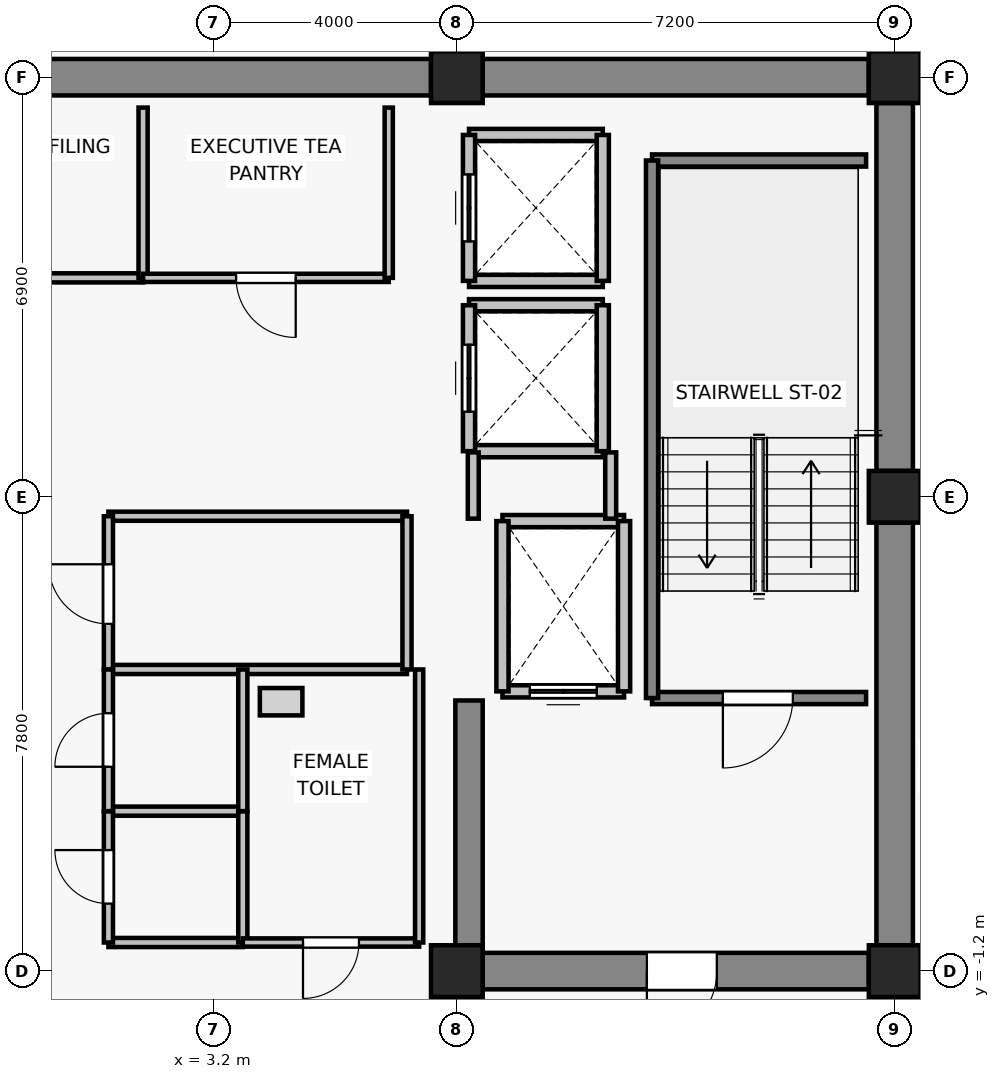
"""IFC4 building model, lengths in metres.
Left out: names, types, materials, properties, quantities, classifications, styles, units other than length and angle.
Written with IfcOpenShell. Run it as: python <this file> out.ifc"""

import sys

from ifc_helpers import new_model, si_unit, direction, frame, frame_2d, origin, origin_2d, place, context, subcontext, project, spatial, rectangle, extrude, source, transform, mapped, element, fill, save


model = new_model("IFC4")
c1 = context("Model", 3, precision=1e-05, world=origin(), true_north=direction((0.0, 1.0)))
c2 = subcontext(c1, "Body", "Model", "MODEL_VIEW")
j1 = project(units=[si_unit("LENGTHUNIT", "METRE"), si_unit("PLANEANGLEUNIT", "RADIAN")], contexts=[c1])
p1 = place(None, origin())
s1 = spatial("IfcSite", under=j1, at=p1, CompositionType="ELEMENT")
p2 = place(p1, origin())
s2 = spatial("IfcBuilding", under=s1, at=p2, CompositionType="ELEMENT")
p3 = place(p2, frame((0.0, 0.0, 248.5)))
s3 = spatial("IfcBuildingStorey", under=s2, at=p3, CompositionType="ELEMENT", Elevation=248.5)
for number, where, z_axis, x_axis in (
    (1, (7.2, -1.2, 0.0), (0.0, 0.0, 1.0), (1.0, 0.0, 0.0)),
    (2, (14.4, -1.2, 0.0), (0.0, 0.0, 1.0), (1.0, 0.0, 0.0)),
    (3, (14.4, 6.6, 0.0), (0.0, 0.0, 1.0), (1.0, 0.0, 0.0)),
    (4, (7.2, 13.5, 0.0), (0.0, 0.0, 1.0), (1.0, 0.0, 0.0)),
    (5, (14.4, 13.5, 0.0), (0.0, 0.0, 1.0), (1.0, 0.0, 0.0)),
):
    element("IfcColumn", number, at=place(p3, frame(where, z_axis=z_axis, x_axis=x_axis)), inside=s3, PredefinedType="COLUMN", context=c2, shape_type="SweptSolid", body=[
        extrude(rectangle(XDim=0.85, YDim=0.85, at=origin_2d()), origin(), (0.0, 0.0, 1.0), 3.3),
    ])
p4 = place(p3, frame((-6.775, 13.5, 0.0), z_axis=(0.0, 0.0, 1.0), x_axis=(1.0, 0.0, 0.0)))
e6 = element("IfcWall", 6, at=p4, inside=s3, PredefinedType="SHEAR", context=c2, shape_type="SweptSolid", body=[
    extrude(rectangle(XDim=13.55, YDim=0.6, at=frame_2d((6.775, 0.0))), origin(), (0.0, 0.0, 1.0), 3.075),
])
p5 = place(p3, frame((7.625, 13.5, 0.0), z_axis=(0.0, 0.0, 1.0), x_axis=(1.0, 0.0, 0.0)))
e7 = element("IfcWall", 7, at=p5, inside=s3, PredefinedType="SHEAR", context=c2, shape_type="SweptSolid", body=[
    extrude(rectangle(XDim=6.35, YDim=0.6, at=frame_2d((3.175, 0.0))), origin(), (0.0, 0.0, 1.0), 3.075),
])
p6 = place(p3, frame((14.4, -0.775, 0.0), z_axis=(0.0, 0.0, 1.0), x_axis=(0.0, 1.0, 0.0)))
e8 = element("IfcWall", 8, at=p6, inside=s3, PredefinedType="SHEAR", context=c2, shape_type="SweptSolid", body=[
    extrude(rectangle(XDim=6.95, YDim=0.6, at=frame_2d((3.475, 0.0))), origin(), (0.0, 0.0, 1.0), 3.075),
])
p7 = place(p3, frame((14.4, 7.025, 0.0), z_axis=(0.0, 0.0, 1.0), x_axis=(0.0, 1.0, 0.0)))
e9 = element("IfcWall", 9, at=p7, inside=s3, PredefinedType="SHEAR", context=c2, shape_type="SweptSolid", body=[
    extrude(rectangle(XDim=6.05, YDim=0.6, at=frame_2d((3.025, 0.0))), origin(), (0.0, 0.0, 1.0), 3.075),
])
p8 = place(p3, frame((13.975, -1.2, 0.0), z_axis=(0.0, 0.0, 1.0), x_axis=(-1.0, 0.0, 0.0)))
e10 = element("IfcWall", 10, at=p8, inside=s3, PredefinedType="SHEAR", context=c2, shape_type="SweptSolid", body=[
    extrude(rectangle(XDim=6.35, YDim=0.6, at=frame_2d((3.175, 0.0))), origin(), (0.0, 0.0, 1.0), 3.075),
])
p9 = place(p8, frame((2.5, 0.0, 0.0)))
e11 = element("IfcOpeningElement", 11, at=p9, cuts=e10, PredefinedType="OPENING", context=c2, shape_type="SweptSolid", body=[
    extrude(rectangle(XDim=1.15, YDim=2.15, at=frame_2d((0.575, 1.075))), frame((0.0, 0.31, 0.0), z_axis=(0.0, -1.0, 0.0), x_axis=(1.0, 0.0, 0.0)), (0.0, 0.0, 1.0), 0.62),
])
p10 = place(p3, frame((7.4, -0.9, 0.0), z_axis=(0.0, 0.0, 1.0), x_axis=(0.0, 1.0, 0.0)))
e12 = element("IfcWall", 12, at=p10, inside=s3, PredefinedType="SHEAR", context=c2, shape_type="SweptSolid", body=[
    extrude(rectangle(XDim=4.15, YDim=0.45, at=frame_2d((2.075, 0.0))), origin(), (0.0, 0.0, 1.0), 3.075),
])
p11 = place(p3, frame((9.95, 3.4, 0.0), z_axis=(0.0, 0.0, 1.0), x_axis=(-1.0, 0.0, 0.0)))
e13 = element("IfcWall", 13, at=p11, inside=s3, PredefinedType="SOLIDWALL", context=c2, shape_type="SweptSolid", body=[
    extrude(rectangle(XDim=2.0, YDim=0.2, at=frame_2d((1.0, 0.0))), origin(), (0.0, 0.0, 1.0), 3.075),
])
p12 = place(p11, frame((0.45, 0.0, 0.0)))
e14 = element("IfcOpeningElement", 14, at=p12, cuts=e13, PredefinedType="OPENING", context=c2, shape_type="SweptSolid", body=[
    extrude(rectangle(XDim=1.1, YDim=2.2, at=frame_2d((0.55, 1.1))), frame((0.0, 0.11, 0.0), z_axis=(0.0, -1.0, 0.0), x_axis=(1.0, 0.0, 0.0)), (0.0, 0.0, 1.0), 0.22),
])
p13 = place(p3, frame((7.95, 6.2, 0.0), z_axis=(0.0, 0.0, 1.0), x_axis=(1.0, 0.0, 0.0)))
e15 = element("IfcWall", 15, at=p13, inside=s3, PredefinedType="SOLIDWALL", context=c2, shape_type="SweptSolid", body=[
    extrude(rectangle(XDim=2.0, YDim=0.2, at=frame_2d((1.0, 0.0))), origin(), (0.0, 0.0, 1.0), 3.075),
])
for number, where, z_axis, x_axis in (
    (16, (7.95, 3.4, 0.0), (0.0, 0.0, 1.0), (0.0, 1.0, 0.0)),
    (17, (9.95, 6.2, 0.0), (0.0, 0.0, 1.0), (0.0, -1.0, 0.0)),
):
    element("IfcWall", number, at=place(p3, frame(where, z_axis=z_axis, x_axis=x_axis)), inside=s3, PredefinedType="SOLIDWALL", context=c2, shape_type="SweptSolid", body=[
        extrude(rectangle(XDim=2.8, YDim=0.2, at=frame_2d((1.4, 0.0))), origin(), (0.0, 0.0, 1.0), 3.075),
    ])
for number, where, z_axis, x_axis in (
    (18, (9.6, 7.35, 0.0), (0.0, 0.0, 1.0), (-1.0, 0.0, 0.0)),
    (19, (7.4, 9.75, 0.0), (0.0, 0.0, 1.0), (1.0, 0.0, 0.0)),
):
    element("IfcWall", number, at=place(p3, frame(where, z_axis=z_axis, x_axis=x_axis)), inside=s3, PredefinedType="SOLIDWALL", context=c2, shape_type="SweptSolid", body=[
        extrude(rectangle(XDim=2.2, YDim=0.2, at=frame_2d((1.1, 0.0))), origin(), (0.0, 0.0, 1.0), 2.615),
    ])
p14 = place(p3, frame((7.4, 7.35, 0.0), z_axis=(0.0, 0.0, 1.0), x_axis=(0.0, 1.0, 0.0)))
e20 = element("IfcWall", 20, at=p14, inside=s3, PredefinedType="SOLIDWALL", context=c2, shape_type="SweptSolid", body=[
    extrude(rectangle(XDim=2.4, YDim=0.2, at=frame_2d((1.2, 0.0))), origin(), (0.0, 0.0, 1.0), 2.615),
])
p15 = place(p14, frame((0.65, 0.0, 0.0)))
e21 = element("IfcOpeningElement", 21, at=p15, cuts=e20, PredefinedType="OPENING", context=c2, shape_type="SweptSolid", body=[
    extrude(rectangle(XDim=1.1, YDim=2.2, at=frame_2d((0.55, 1.1))), frame((0.0, 0.11, 0.0), z_axis=(0.0, -1.0, 0.0), x_axis=(1.0, 0.0, 0.0)), (0.0, 0.0, 1.0), 0.22),
])
p16 = place(p3, frame((9.6, 9.75, 0.0), z_axis=(0.0, 0.0, 1.0), x_axis=(0.0, -1.0, 0.0)))
e22 = element("IfcWall", 22, at=p16, inside=s3, PredefinedType="SOLIDWALL", context=c2, shape_type="SweptSolid", body=[
    extrude(rectangle(XDim=2.4, YDim=0.2, at=frame_2d((1.2, 0.0))), origin(), (0.0, 0.0, 1.0), 3.075),
])
for number, where, z_axis, x_axis in (
    (23, (9.6, 10.15, 0.0), (0.0, 0.0, 1.0), (-1.0, 0.0, 0.0)),
    (24, (7.4, 12.55, 0.0), (0.0, 0.0, 1.0), (1.0, 0.0, 0.0)),
):
    element("IfcWall", number, at=place(p3, frame(where, z_axis=z_axis, x_axis=x_axis)), inside=s3, PredefinedType="SOLIDWALL", context=c2, shape_type="SweptSolid", body=[
        extrude(rectangle(XDim=2.2, YDim=0.2, at=frame_2d((1.1, 0.0))), origin(), (0.0, 0.0, 1.0), 2.615),
    ])
p17 = place(p3, frame((7.4, 10.15, 0.0), z_axis=(0.0, 0.0, 1.0), x_axis=(0.0, 1.0, 0.0)))
e25 = element("IfcWall", 25, at=p17, inside=s3, PredefinedType="SOLIDWALL", context=c2, shape_type="SweptSolid", body=[
    extrude(rectangle(XDim=2.4, YDim=0.2, at=frame_2d((1.2, 0.0))), origin(), (0.0, 0.0, 1.0), 2.615),
])
p18 = place(p17, frame((0.65, 0.0, 0.0)))
e26 = element("IfcOpeningElement", 26, at=p18, cuts=e25, PredefinedType="OPENING", context=c2, shape_type="SweptSolid", body=[
    extrude(rectangle(XDim=1.1, YDim=2.2, at=frame_2d((0.55, 1.1))), frame((0.0, 0.11, 0.0), z_axis=(0.0, -1.0, 0.0), x_axis=(1.0, 0.0, 0.0)), (0.0, 0.0, 1.0), 0.22),
])
p19 = place(p3, frame((9.6, 12.55, 0.0), z_axis=(0.0, 0.0, 1.0), x_axis=(0.0, -1.0, 0.0)))
e27 = element("IfcWall", 27, at=p19, inside=s3, PredefinedType="SOLIDWALL", context=c2, shape_type="SweptSolid", body=[
    extrude(rectangle(XDim=2.4, YDim=0.2, at=frame_2d((1.2, 0.0))), origin(), (0.0, 0.0, 1.0), 3.075),
])
p20 = place(p3, frame((13.93, 3.29, 0.0), z_axis=(0.0, 0.0, 1.0), x_axis=(-1.0, 0.0, 0.0)))
e28 = element("IfcWall", 28, at=p20, inside=s3, PredefinedType="SOLIDWALL", context=c2, shape_type="SweptSolid", body=[
    extrude(rectangle(XDim=3.52, YDim=0.2, at=frame_2d((1.76, 0.0))), origin(), (0.0, 0.0, 1.0), 3.075),
])
p21 = place(p20, frame((1.205, 0.0, 0.0)))
e29 = element("IfcOpeningElement", 29, at=p21, cuts=e28, PredefinedType="OPENING", context=c2, shape_type="SweptSolid", body=[
    extrude(rectangle(XDim=1.15, YDim=2.15, at=frame_2d((0.575, 1.075))), frame((0.0, 0.11, 0.0), z_axis=(0.0, -1.0, 0.0), x_axis=(1.0, 0.0, 0.0)), (0.0, 0.0, 1.0), 0.22),
])
p22 = place(p3, frame((10.41, 12.13, 0.0), z_axis=(0.0, 0.0, 1.0), x_axis=(1.0, 0.0, 0.0)))
e30 = element("IfcWall", 30, at=p22, inside=s3, PredefinedType="SOLIDWALL", context=c2, shape_type="SweptSolid", body=[
    extrude(rectangle(XDim=3.52, YDim=0.2, at=frame_2d((1.76, 0.0))), origin(), (0.0, 0.0, 1.0), 3.075),
])
p23 = place(p3, frame((10.41, 3.29, 0.0), z_axis=(0.0, 0.0, 1.0), x_axis=(0.0, 1.0, 0.0)))
e31 = element("IfcWall", 31, at=p23, inside=s3, PredefinedType="SOLIDWALL", context=c2, shape_type="SweptSolid", body=[
    extrude(rectangle(XDim=8.84, YDim=0.2, at=frame_2d((4.42, 0.0))), origin(), (0.0, 0.0, 1.0), 3.075),
])
p24 = place(p3, frame((7.47, 6.24, 0.0), z_axis=(0.0, 0.0, 1.0), x_axis=(0.0, 1.0, 0.0)))
e32 = element("IfcWall", 32, at=p24, inside=s3, PredefinedType="PARTITIONING", context=c2, shape_type="SweptSolid", body=[
    extrude(rectangle(XDim=1.09, YDim=0.18, at=frame_2d((0.545, 0.0))), origin(), (0.0, 0.0, 1.0), 2.615),
])
p25 = place(p3, frame((9.73, 7.33, 0.0), z_axis=(0.0, 0.0, 1.0), x_axis=(0.0, -1.0, 0.0)))
e33 = element("IfcWall", 33, at=p25, inside=s3, PredefinedType="PARTITIONING", context=c2, shape_type="SweptSolid", body=[
    extrude(rectangle(XDim=1.09, YDim=0.18, at=frame_2d((0.545, 0.0))), origin(), (0.0, 0.0, 1.0), 3.075),
])
p26 = place(p3, frame((2.04, 10.2, 0.0), z_axis=(0.0, 0.0, 1.0), x_axis=(-1.0, 0.0, 0.0)))
e34 = element("IfcWall", 34, at=p26, inside=s3, PredefinedType="PARTITIONING", context=c2, shape_type="SweptSolid", body=[
    extrude(rectangle(XDim=4.16, YDim=0.15, at=frame_2d((2.08, 0.0))), origin(), (0.0, 0.0, 1.0), 3.075),
])
p27 = place(p26, frame((1.55, 0.0, 0.0)))
e35 = element("IfcOpeningElement", 35, at=p27, cuts=e34, PredefinedType="OPENING", context=c2, shape_type="SweptSolid", body=[
    extrude(rectangle(XDim=0.98, YDim=2.15, at=frame_2d((0.49, 1.075))), frame((0.0, 0.085, 0.0), z_axis=(0.0, -1.0, 0.0), x_axis=(1.0, 0.0, 0.0)), (0.0, 0.0, 1.0), 0.17),
])
p28 = place(p3, frame((2.04, 13.0, 0.0), z_axis=(0.0, 0.0, 1.0), x_axis=(0.0, -1.0, 0.0)))
e36 = element("IfcWall", 36, at=p28, inside=s3, PredefinedType="PARTITIONING", context=c2, shape_type="SweptSolid", body=[
    extrude(rectangle(XDim=2.8, YDim=0.15, at=frame_2d((1.4, 0.0))), origin(), (0.0, 0.0, 1.0), 3.075),
])
p29 = place(p3, frame((6.08, 10.2, 0.0), z_axis=(0.0, 0.0, 1.0), x_axis=(-1.0, 0.0, 0.0)))
e37 = element("IfcWall", 37, at=p29, inside=s3, PredefinedType="PARTITIONING", context=c2, shape_type="SweptSolid", body=[
    extrude(rectangle(XDim=4.04, YDim=0.135, at=frame_2d((2.02, 0.0))), origin(), (0.0, 0.0, 1.0), 3.075),
])
p30 = place(p29, frame((1.53, 0.0, 0.0)))
e38 = element("IfcOpeningElement", 38, at=p30, cuts=e37, PredefinedType="OPENING", context=c2, shape_type="SweptSolid", body=[
    extrude(rectangle(XDim=0.98, YDim=2.15, at=frame_2d((0.49, 1.075))), frame((0.0, 0.077, 0.0), z_axis=(0.0, -1.0, 0.0), x_axis=(1.0, 0.0, 0.0)), (0.0, 0.0, 1.0), 0.155),
])
p31 = place(p3, frame((6.08, 13.0, 0.0), z_axis=(0.0, 0.0, 1.0), x_axis=(0.0, -1.0, 0.0)))
e39 = element("IfcWall", 39, at=p31, inside=s3, PredefinedType="PARTITIONING", context=c2, shape_type="SweptSolid", body=[
    extrude(rectangle(XDim=2.8, YDim=0.135, at=frame_2d((1.4, 0.0))), origin(), (0.0, 0.0, 1.0), 3.075),
])
for number, where, z_axis, x_axis in (
    (40, (6.38, 3.76, 0.0), (0.0, 0.0, 1.0), (-1.0, 0.0, 0.0)),
    (41, (1.47, 6.28, 0.0), (0.0, 0.0, 1.0), (1.0, 0.0, 0.0)),
):
    element("IfcWall", number, at=place(p3, frame(where, z_axis=z_axis, x_axis=x_axis)), inside=s3, PredefinedType="PARTITIONING", context=c2, shape_type="SweptSolid", body=[
        extrude(rectangle(XDim=4.91, YDim=0.15, at=frame_2d((2.455, 0.0))), origin(), (0.0, 0.0, 1.0), 3.075),
    ])
p32 = place(p3, frame((1.47, 3.76, 0.0), z_axis=(0.0, 0.0, 1.0), x_axis=(0.0, 1.0, 0.0)))
e42 = element("IfcWall", 42, at=p32, inside=s3, PredefinedType="PARTITIONING", context=c2, shape_type="SweptSolid", body=[
    extrude(rectangle(XDim=2.52, YDim=0.15, at=frame_2d((1.26, 0.0))), origin(), (0.0, 0.0, 1.0), 3.075),
])
p33 = place(p32, frame((0.75, 0.0, 0.0)))
e43 = element("IfcOpeningElement", 43, at=p33, cuts=e42, PredefinedType="OPENING", context=c2, shape_type="SweptSolid", body=[
    extrude(rectangle(XDim=0.98, YDim=2.15, at=frame_2d((0.49, 1.075))), frame((0.0, 0.085, 0.0), z_axis=(0.0, -1.0, 0.0), x_axis=(1.0, 0.0, 0.0)), (0.0, 0.0, 1.0), 0.17),
])
p34 = place(p3, frame((6.38, 6.28, 0.0), z_axis=(0.0, 0.0, 1.0), x_axis=(0.0, -1.0, 0.0)))
e44 = element("IfcWall", 44, at=p34, inside=s3, PredefinedType="PARTITIONING", context=c2, shape_type="SweptSolid", body=[
    extrude(rectangle(XDim=2.52, YDim=0.15, at=frame_2d((1.26, 0.0))), origin(), (0.0, 0.0, 1.0), 3.075),
])
for number, where, z_axis, x_axis in (
    (45, (3.68, -0.73, 0.0), (0.0, 0.0, 1.0), (-1.0, 0.0, 0.0)),
    (46, (1.47, 1.43, 0.0), (0.0, 0.0, 1.0), (1.0, 0.0, 0.0)),
):
    element("IfcWall", number, at=place(p3, frame(where, z_axis=z_axis, x_axis=x_axis)), inside=s3, PredefinedType="PARTITIONING", context=c2, shape_type="SweptSolid", body=[
        extrude(rectangle(XDim=2.21, YDim=0.15, at=frame_2d((1.105, 0.0))), origin(), (0.0, 0.0, 1.0), 3.075),
    ])
p35 = place(p3, frame((1.47, -0.73, 0.0), z_axis=(0.0, 0.0, 1.0), x_axis=(0.0, 1.0, 0.0)))
e47 = element("IfcWall", 47, at=p35, inside=s3, PredefinedType="PARTITIONING", context=c2, shape_type="SweptSolid", body=[
    extrude(rectangle(XDim=2.16, YDim=0.15, at=frame_2d((1.08, 0.0))), origin(), (0.0, 0.0, 1.0), 3.075),
])
p36 = place(p35, frame((0.64, 0.0, 0.0)))
e48 = element("IfcOpeningElement", 48, at=p36, cuts=e47, PredefinedType="OPENING", context=c2, shape_type="SweptSolid", body=[
    extrude(rectangle(XDim=0.88, YDim=2.1, at=frame_2d((0.44, 1.05))), frame((0.0, 0.085, 0.0), z_axis=(0.0, -1.0, 0.0), x_axis=(1.0, 0.0, 0.0)), (0.0, 0.0, 1.0), 0.17),
])
p37 = place(p3, frame((3.68, 1.43, 0.0), z_axis=(0.0, 0.0, 1.0), x_axis=(0.0, -1.0, 0.0)))
e49 = element("IfcWall", 49, at=p37, inside=s3, PredefinedType="PARTITIONING", context=c2, shape_type="SweptSolid", body=[
    extrude(rectangle(XDim=2.16, YDim=0.15, at=frame_2d((1.08, 0.0))), origin(), (0.0, 0.0, 1.0), 3.075),
])
p38 = place(p3, frame((1.47, 1.43, 0.0), z_axis=(0.0, 0.0, 1.0), x_axis=(0.0, 1.0, 0.0)))
e50 = element("IfcWall", 50, at=p38, inside=s3, PredefinedType="PARTITIONING", context=c2, shape_type="SweptSolid", body=[
    extrude(rectangle(XDim=2.33, YDim=0.15, at=frame_2d((1.165, 0.0))), origin(), (0.0, 0.0, 1.0), 3.075),
])
p39 = place(p38, frame((0.73, 0.0, 0.0)))
e51 = element("IfcOpeningElement", 51, at=p39, cuts=e50, PredefinedType="OPENING", context=c2, shape_type="SweptSolid", body=[
    extrude(rectangle(XDim=0.88, YDim=2.15, at=frame_2d((0.44, 1.075))), frame((0.0, 0.085, 0.0), z_axis=(0.0, -1.0, 0.0), x_axis=(1.0, 0.0, 0.0)), (0.0, 0.0, 1.0), 0.17),
])
p40 = place(p3, frame((3.68, 3.76, 0.0), z_axis=(0.0, 0.0, 1.0), x_axis=(0.0, -1.0, 0.0)))
e52 = element("IfcWall", 52, at=p40, inside=s3, PredefinedType="PARTITIONING", context=c2, shape_type="SweptSolid", body=[
    extrude(rectangle(XDim=2.33, YDim=0.15, at=frame_2d((1.165, 0.0))), origin(), (0.0, 0.0, 1.0), 3.075),
])
p41 = place(p3, frame((6.58, -0.73, 0.0), z_axis=(0.0, 0.0, 1.0), x_axis=(-1.0, 0.0, 0.0)))
e53 = element("IfcWall", 53, at=p41, inside=s3, PredefinedType="PARTITIONING", context=c2, shape_type="SweptSolid", body=[
    extrude(rectangle(XDim=2.9, YDim=0.135, at=frame_2d((1.45, 0.0))), origin(), (0.0, 0.0, 1.0), 3.075),
])
p42 = place(p41, frame((0.99, 0.0, 0.0)))
e54 = element("IfcOpeningElement", 54, at=p42, cuts=e53, PredefinedType="OPENING", context=c2, shape_type="SweptSolid", body=[
    extrude(rectangle(XDim=0.92, YDim=2.1, at=frame_2d((0.46, 1.05))), frame((0.0, 0.077, 0.0), z_axis=(0.0, -1.0, 0.0), x_axis=(1.0, 0.0, 0.0)), (0.0, 0.0, 1.0), 0.155),
])
p43 = place(p3, frame((6.58, 3.76, 0.0), z_axis=(0.0, 0.0, 1.0), x_axis=(0.0, -1.0, 0.0)))
e55 = element("IfcWall", 55, at=p43, inside=s3, PredefinedType="PARTITIONING", context=c2, shape_type="SweptSolid", body=[
    extrude(rectangle(XDim=4.49, YDim=0.135, at=frame_2d((2.245, 0.0))), origin(), (0.0, 0.0, 1.0), 3.075),
])
m1 = source(origin(), c2, "Body", "SweptSolid", [
    extrude(rectangle(XDim=1.1, YDim=2.2, at=frame_2d((0.55, 1.1))), frame((0.0, 0.025, 0.0), z_axis=(0.0, -1.0, 0.0), x_axis=(1.0, 0.0, 0.0)), (0.0, 0.0, 1.0), 0.05),
])
p44 = place(p12, origin())
e56 = element("IfcDoor", 56, at=p44, inside=s3, OperationType="DOUBLE_DOOR_SLIDING", PredefinedType="DOOR", context=c2, shape_type="MappedRepresentation", body=[
    mapped(m1, transform((0.0, 0.0, 0.0), x_axis=(1.0, 0.0, 0.0), y_axis=(0.0, 1.0, 0.0), z_axis=(0.0, 0.0, 1.0), scale=1.0)),
])
fill(e14, e56)
p45 = place(p15, origin())
e57 = element("IfcDoor", 57, at=p45, inside=s3, OperationType="DOUBLE_DOOR_SLIDING", PredefinedType="DOOR", context=c2, shape_type="MappedRepresentation", body=[
    mapped(m1, transform((0.0, 0.0, 0.0), x_axis=(1.0, 0.0, 0.0), y_axis=(0.0, 1.0, 0.0), z_axis=(0.0, 0.0, 1.0), scale=1.0)),
])
fill(e21, e57)
p46 = place(p18, origin())
e58 = element("IfcDoor", 58, at=p46, inside=s3, OperationType="DOUBLE_DOOR_SLIDING", PredefinedType="DOOR", context=c2, shape_type="MappedRepresentation", body=[
    mapped(m1, transform((0.0, 0.0, 0.0), x_axis=(1.0, 0.0, 0.0), y_axis=(0.0, 1.0, 0.0), z_axis=(0.0, 0.0, 1.0), scale=1.0)),
])
fill(e26, e58)
m2 = source(origin(), c2, "Body", "SweptSolid", [
    extrude(rectangle(XDim=1.15, YDim=2.15, at=frame_2d((0.575, 1.075))), frame((0.0, 0.025, 0.0), z_axis=(0.0, -1.0, 0.0), x_axis=(1.0, 0.0, 0.0)), (0.0, 0.0, 1.0), 0.05),
])
p47 = place(p21, origin())
e59 = element("IfcDoor", 59, at=p47, inside=s3, OperationType="SINGLE_SWING_RIGHT", PredefinedType="DOOR", context=c2, shape_type="MappedRepresentation", body=[
    mapped(m2, transform((0.0, 0.0, 0.0), x_axis=(1.0, 0.0, 0.0), y_axis=(0.0, 1.0, 0.0), z_axis=(0.0, 0.0, 1.0), scale=1.0)),
])
fill(e29, e59)
p48 = place(p9, origin())
e60 = element("IfcDoor", 60, at=p48, inside=s3, OperationType="SINGLE_SWING_RIGHT", PredefinedType="DOOR", context=c2, shape_type="MappedRepresentation", body=[
    mapped(m2, transform((0.0, 0.0, 0.0), x_axis=(1.0, 0.0, 0.0), y_axis=(0.0, 1.0, 0.0), z_axis=(0.0, 0.0, 1.0), scale=1.0)),
])
fill(e11, e60)
m3 = source(origin(), c2, "Body", "SweptSolid", [
    extrude(rectangle(XDim=0.98, YDim=2.15, at=frame_2d((0.49, 1.075))), frame((0.0, 0.025, 0.0), z_axis=(0.0, -1.0, 0.0), x_axis=(1.0, 0.0, 0.0)), (0.0, 0.0, 1.0), 0.05),
])
p49 = place(p30, origin())
e61 = element("IfcDoor", 61, at=p49, inside=s3, OperationType="SINGLE_SWING_LEFT", PredefinedType="DOOR", context=c2, shape_type="MappedRepresentation", body=[
    mapped(m3, transform((0.0, 0.0, 0.0), x_axis=(1.0, 0.0, 0.0), y_axis=(0.0, 1.0, 0.0), z_axis=(0.0, 0.0, 1.0), scale=1.0)),
])
fill(e38, e61)
p50 = place(p33, origin())
e62 = element("IfcDoor", 62, at=p50, inside=s3, OperationType="SINGLE_SWING_RIGHT", PredefinedType="DOOR", context=c2, shape_type="MappedRepresentation", body=[
    mapped(m3, transform((0.0, 0.0, 0.0), x_axis=(1.0, 0.0, 0.0), y_axis=(0.0, 1.0, 0.0), z_axis=(0.0, 0.0, 1.0), scale=1.0)),
])
fill(e43, e62)
m4 = source(origin(), c2, "Body", "SweptSolid", [
    extrude(rectangle(XDim=0.88, YDim=2.1, at=frame_2d((0.44, 1.05))), frame((0.0, 0.025, 0.0), z_axis=(0.0, -1.0, 0.0), x_axis=(1.0, 0.0, 0.0)), (0.0, 0.0, 1.0), 0.05),
])
p51 = place(p36, origin())
e63 = element("IfcDoor", 63, at=p51, inside=s3, OperationType="SINGLE_SWING_RIGHT", PredefinedType="DOOR", context=c2, shape_type="MappedRepresentation", body=[
    mapped(m4, transform((0.0, 0.0, 0.0), x_axis=(1.0, 0.0, 0.0), y_axis=(0.0, 1.0, 0.0), z_axis=(0.0, 0.0, 1.0), scale=1.0)),
])
fill(e48, e63)
m5 = source(origin(), c2, "Body", "SweptSolid", [
    extrude(rectangle(XDim=0.88, YDim=2.15, at=frame_2d((0.44, 1.075))), frame((0.0, 0.025, 0.0), z_axis=(0.0, -1.0, 0.0), x_axis=(1.0, 0.0, 0.0)), (0.0, 0.0, 1.0), 0.05),
])
p52 = place(p39, origin())
e64 = element("IfcDoor", 64, at=p52, inside=s3, OperationType="SINGLE_SWING_LEFT", PredefinedType="DOOR", context=c2, shape_type="MappedRepresentation", body=[
    mapped(m5, transform((0.0, 0.0, 0.0), x_axis=(1.0, 0.0, 0.0), y_axis=(0.0, 1.0, 0.0), z_axis=(0.0, 0.0, 1.0), scale=1.0)),
])
fill(e51, e64)
m6 = source(origin(), c2, "Body", "SweptSolid", [
    extrude(rectangle(XDim=0.92, YDim=2.1, at=frame_2d((0.46, 1.05))), frame((0.0, 0.025, 0.0), z_axis=(0.0, -1.0, 0.0), x_axis=(1.0, 0.0, 0.0)), (0.0, 0.0, 1.0), 0.05),
])
p53 = place(p42, origin())
e65 = element("IfcDoor", 65, at=p53, inside=s3, OperationType="SINGLE_SWING_RIGHT", PredefinedType="DOOR", context=c2, shape_type="MappedRepresentation", body=[
    mapped(m6, transform((0.0, 0.0, 0.0), x_axis=(1.0, 0.0, 0.0), y_axis=(0.0, 1.0, 0.0), z_axis=(0.0, 0.0, 1.0), scale=1.0)),
])
fill(e54, e65)
save(model, sys.argv[1])
